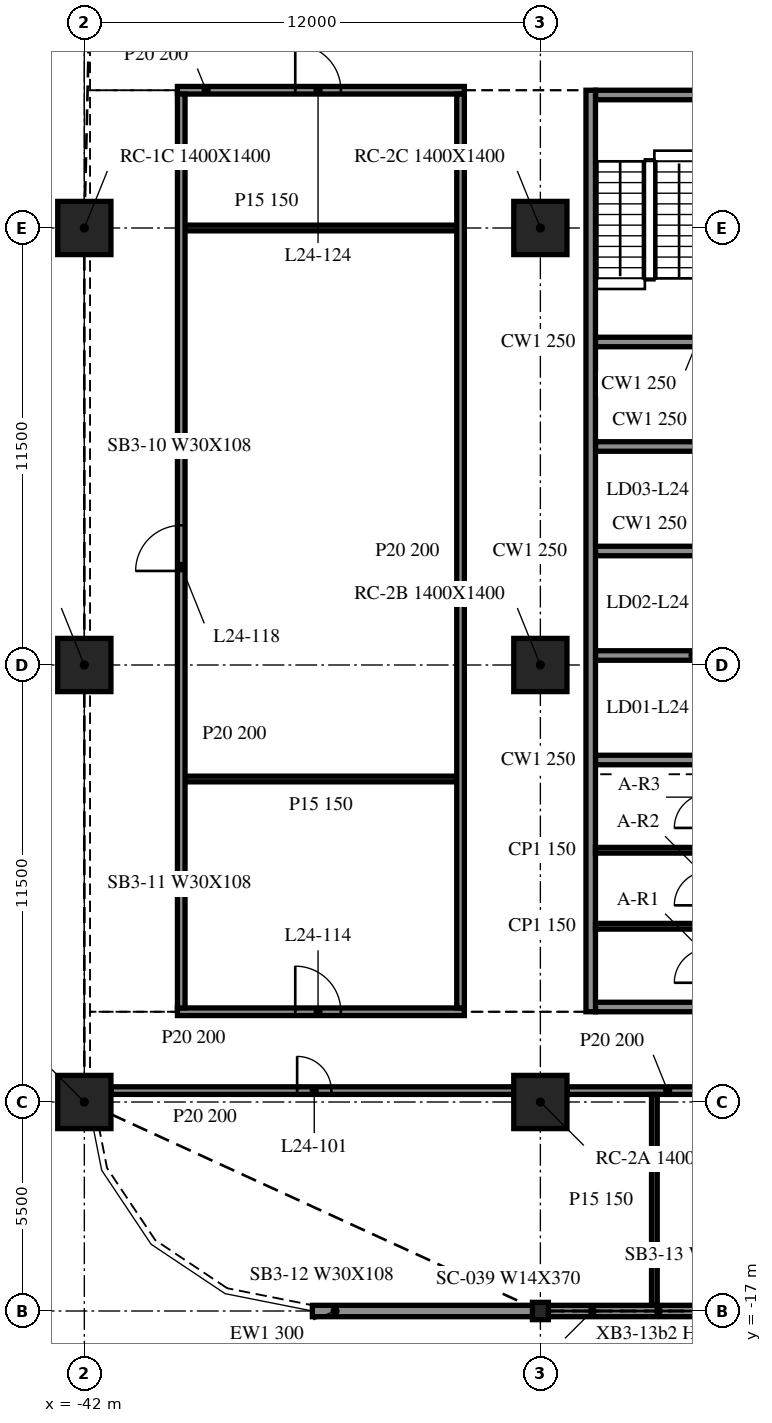
"""IFC4 building model, lengths in metres.
Left out: names, types, materials, properties, quantities, classifications, styles, units other than length and angle.
Written with IfcOpenShell. Run it as: python <this file> out.ifc"""

import sys

from ifc_helpers import new_model, si_unit, direction, frame, frame_2d, origin, origin_2d, place, context, subcontext, project, spatial, rectangle, i_section, extrude, element, fill, save


model = new_model("IFC4")
c1 = context("Model", 3, precision=1e-05, world=origin(), true_north=direction((0.0, 1.0)))
c2 = subcontext(c1, "Body", "Model", "MODEL_VIEW")
j1 = project(units=[si_unit("LENGTHUNIT", "METRE"), si_unit("PLANEANGLEUNIT", "RADIAN")], contexts=[c1])
p1 = place(None, origin())
s1 = spatial("IfcSite", under=j1, at=p1, CompositionType="ELEMENT")
p2 = place(p1, origin())
s2 = spatial("IfcBuilding", under=s1, at=p2, CompositionType="ELEMENT")
p3 = place(p2, frame((0.0, 0.0, 105.3)))
s3 = spatial("IfcBuildingStorey", under=s2, at=p3, CompositionType="ELEMENT", Elevation=105.3)
for number, where, z_axis, x_axis in (
    (1, (-42.0, -11.5, -0.34), (0.0, 0.0, 1.0), (1.0, 0.0, 0.0)),
    (2, (-42.0, 0.0, -0.34), (0.0, 0.0, 1.0), (1.0, 0.0, 0.0)),
    (3, (-42.0, 11.5, -0.34), (0.0, 0.0, 1.0), (1.0, 0.0, 0.0)),
    (4, (-30.0, -11.5, -0.34), (0.0, 0.0, 1.0), (1.0, 0.0, 0.0)),
    (5, (-30.0, 0.0, -0.34), (0.0, 0.0, 1.0), (1.0, 0.0, 0.0)),
    (6, (-30.0, 11.5, -0.34), (0.0, 0.0, 1.0), (1.0, 0.0, 0.0)),
):
    element("IfcColumn", number, at=place(p3, frame(where, z_axis=z_axis, x_axis=x_axis)), inside=s3, PredefinedType="COLUMN", context=c2, shape_type="SweptSolid", body=[
        extrude(rectangle(XDim=1.4, YDim=1.4, at=origin_2d()), origin(), (0.0, 0.0, 1.0), 4.1),
    ])
p4 = place(p3, frame((-30.0, -17.0, -0.34), z_axis=(0.0, 0.0, 1.0), x_axis=(1.0, 0.0, 0.0)))
e7 = element("IfcColumn", 7, at=p4, inside=s3, PredefinedType="COLUMN", context=c2, shape_type="SweptSolid", body=[
    extrude(i_section(OverallWidth=0.419, OverallDepth=0.455, WebThickness=0.042, FlangeThickness=0.068, at=origin_2d()), origin(), (0.0, 0.0, 1.0), 4.1),
])
p5 = place(p3, frame((-36.0, -17.0, 0.0), z_axis=(0.0, 0.0, 1.0), x_axis=(1.0, 0.0, 0.0)))
e8 = element("IfcWall", 8, at=p5, inside=s3, PredefinedType="NOTDEFINED", context=c2, shape_type="SweptSolid", body=[
    extrude(rectangle(XDim=5.979, YDim=0.3, at=frame_2d((2.99, 0.0))), origin(), (0.0, 0.0, 1.0), 3.003),
])
p6 = place(p3, frame((-29.979, -17.0, 0.0), z_axis=(0.0, 0.0, 1.0), x_axis=(1.0, 0.0, 0.0)))
e9 = element("IfcWall", 9, at=p6, inside=s3, PredefinedType="NOTDEFINED", context=c2, shape_type="SweptSolid", body=[
    extrude(rectangle(XDim=11.958, YDim=0.3, at=frame_2d((5.979, 0.0))), origin(), (0.0, 0.0, 1.0), 3.003),
])
p7 = place(p3, frame((-28.675, 15.125, 0.0), z_axis=(0.0, 0.0, 1.0), x_axis=(0.0, -1.0, 0.0)))
e10 = element("IfcWall", 10, at=p7, inside=s3, PredefinedType="SOLIDWALL", context=c2, shape_type="SweptSolid", body=[
    extrude(rectangle(XDim=24.25, YDim=0.25, at=frame_2d((12.125, 0.0))), origin(), (0.0, 0.0, 1.0), 3.76),
])
p8 = place(p3, frame((-19.45, -9.0, 0.0), z_axis=(0.0, 0.0, 1.0), x_axis=(-1.0, 0.0, 0.0)))
e11 = element("IfcWall", 11, at=p8, inside=s3, PredefinedType="SOLIDWALL", context=c2, shape_type="SweptSolid", body=[
    extrude(rectangle(XDim=9.1, YDim=0.25, at=frame_2d((4.55, 0.0))), origin(), (0.0, 0.0, 1.0), 3.76),
])
p9 = place(p8, frame((3.65, 0.0, 0.0)))
e12 = element("IfcOpeningElement", 12, at=p9, cuts=e11, PredefinedType="OPENING", context=c2, shape_type="SweptSolid", body=[
    extrude(rectangle(XDim=1.8, YDim=2.1, at=frame_2d((0.9, 1.05))), frame((0.0, 0.135, 0.0), z_axis=(0.0, -1.0, 0.0), x_axis=(1.0, 0.0, 0.0)), (0.0, 0.0, 1.0), 0.27),
])
p10 = place(p3, frame((-28.55, 15.0, 0.0), z_axis=(0.0, 0.0, 1.0), x_axis=(1.0, 0.0, 0.0)))
e13 = element("IfcWall", 13, at=p10, inside=s3, PredefinedType="SOLIDWALL", context=c2, shape_type="SweptSolid", body=[
    extrude(rectangle(XDim=9.1, YDim=0.25, at=frame_2d((4.55, 0.0))), origin(), (0.0, 0.0, 1.0), 3.76),
])
p11 = place(p10, frame((3.65, 0.0, 0.0)))
e14 = element("IfcOpeningElement", 14, at=p11, cuts=e13, PredefinedType="OPENING", context=c2, shape_type="SweptSolid", body=[
    extrude(rectangle(XDim=1.8, YDim=2.1, at=frame_2d((0.9, 1.05))), frame((0.0, 0.135, 0.0), z_axis=(0.0, -1.0, 0.0), x_axis=(1.0, 0.0, 0.0)), (0.0, 0.0, 1.0), 0.27),
])
for number, where, z_axis, x_axis in (
    (15, (-28.55, -2.5, 0.0), (0.0, 0.0, 1.0), (1.0, 0.0, 0.0)),
    (16, (-28.55, 0.25, 0.0), (0.0, 0.0, 1.0), (1.0, 0.0, 0.0)),
    (17, (-28.55, 3.0, 0.0), (0.0, 0.0, 1.0), (1.0, 0.0, 0.0)),
    (18, (-28.55, 5.75, 0.0), (0.0, 0.0, 1.0), (1.0, 0.0, 0.0)),
    (19, (-28.55, 8.5, 0.0), (0.0, 0.0, 1.0), (1.0, 0.0, 0.0)),
):
    element("IfcWall", number, at=place(p3, frame(where, z_axis=z_axis, x_axis=x_axis)), inside=s3, PredefinedType="SOLIDWALL", context=c2, shape_type="SweptSolid", body=[
        extrude(rectangle(XDim=2.85, YDim=0.25, at=frame_2d((1.425, 0.0))), origin(), (0.0, 0.0, 1.0), 3.76),
    ])
for number, where, z_axis, x_axis in (
    (20, (-28.55, -6.875, 0.0), (0.0, 0.0, 1.0), (1.0, 0.0, 0.0)),
    (21, (-28.55, -4.875, 0.0), (0.0, 0.0, 1.0), (1.0, 0.0, 0.0)),
):
    element("IfcWall", number, at=place(p3, frame(where, z_axis=z_axis, x_axis=x_axis)), inside=s3, PredefinedType="PARTITIONING", context=c2, shape_type="SweptSolid", body=[
        extrude(rectangle(XDim=2.85, YDim=0.15, at=frame_2d((1.425, 0.0))), origin(), (0.0, 0.0, 1.0), 3.76),
    ])
p12 = place(p3, frame((-41.3, -11.2, 0.0), z_axis=(0.0, 0.0, 1.0), x_axis=(1.0, 0.0, 0.0)))
e22 = element("IfcWall", 22, at=p12, inside=s3, PredefinedType="PARTITIONING", context=c2, shape_type="SweptSolid", body=[
    extrude(rectangle(XDim=10.6, YDim=0.2, at=frame_2d((5.3, 0.0))), origin(), (0.0, 0.0, 1.0), 3.76),
])
p13 = place(p12, frame((4.9, 0.0, 0.0)))
e23 = element("IfcOpeningElement", 23, at=p13, cuts=e22, PredefinedType="OPENING", context=c2, shape_type="SweptSolid", body=[
    extrude(rectangle(XDim=0.9, YDim=2.1, at=frame_2d((0.45, 1.05))), frame((0.0, 0.11, 0.0), z_axis=(0.0, -1.0, 0.0), x_axis=(1.0, 0.0, 0.0)), (0.0, 0.0, 1.0), 0.22),
])
p14 = place(p3, frame((-29.3, -11.2, 0.0), z_axis=(0.0, 0.0, 1.0), x_axis=(1.0, 0.0, 0.0)))
e24 = element("IfcWall", 24, at=p14, inside=s3, PredefinedType="PARTITIONING", context=c2, shape_type="SweptSolid", body=[
    extrude(rectangle(XDim=10.6, YDim=0.2, at=frame_2d((5.3, 0.0))), origin(), (0.0, 0.0, 1.0), 3.76),
])
p15 = place(p14, frame((4.9, 0.0, 0.0)))
e25 = element("IfcOpeningElement", 25, at=p15, cuts=e24, PredefinedType="OPENING", context=c2, shape_type="SweptSolid", body=[
    extrude(rectangle(XDim=0.9, YDim=2.1, at=frame_2d((0.45, 1.05))), frame((0.0, 0.11, 0.0), z_axis=(0.0, -1.0, 0.0), x_axis=(1.0, 0.0, 0.0)), (0.0, 0.0, 1.0), 0.22),
])
p16 = place(p14, frame((8.7, 0.0, 0.0)))
e26 = element("IfcOpeningElement", 26, at=p16, cuts=e24, PredefinedType="OPENING", context=c2, shape_type="SweptSolid", body=[
    extrude(rectangle(XDim=0.9, YDim=2.1, at=frame_2d((0.45, 1.05))), frame((0.0, 0.11, 0.0), z_axis=(0.0, -1.0, 0.0), x_axis=(1.0, 0.0, 0.0)), (0.0, 0.0, 1.0), 0.22),
])
p17 = place(p3, frame((-39.55, -9.125, 0.0), z_axis=(0.0, 0.0, 1.0), x_axis=(1.0, 0.0, 0.0)))
e27 = element("IfcWall", 27, at=p17, inside=s3, PredefinedType="PARTITIONING", context=c2, shape_type="SweptSolid", body=[
    extrude(rectangle(XDim=7.55, YDim=0.2, at=frame_2d((3.775, 0.0))), origin(), (0.0, 0.0, 1.0), 3.76),
])
p18 = place(p17, frame((3.1, 0.0, 0.0)))
e28 = element("IfcOpeningElement", 28, at=p18, cuts=e27, PredefinedType="OPENING", context=c2, shape_type="SweptSolid", body=[
    extrude(rectangle(XDim=1.2, YDim=2.1, at=frame_2d((0.6, 1.05))), frame((0.0, 0.11, 0.0), z_axis=(0.0, -1.0, 0.0), x_axis=(1.0, 0.0, 0.0)), (0.0, 0.0, 1.0), 0.22),
])
for number, where, z_axis, x_axis in (
    (29, (-39.35, -3.0, 0.0), (0.0, 0.0, 1.0), (1.0, 0.0, 0.0)),
    (30, (-39.35, 11.5, 0.0), (0.0, 0.0, 1.0), (1.0, 0.0, 0.0)),
):
    element("IfcWall", number, at=place(p3, frame(where, z_axis=z_axis, x_axis=x_axis)), inside=s3, PredefinedType="PARTITIONING", context=c2, shape_type="SweptSolid", body=[
        extrude(rectangle(XDim=7.15, YDim=0.15, at=frame_2d((3.575, 0.0))), origin(), (0.0, 0.0, 1.0), 3.76),
    ])
p19 = place(p3, frame((-39.55, 15.125, 0.0), z_axis=(0.0, 0.0, 1.0), x_axis=(1.0, 0.0, 0.0)))
e31 = element("IfcWall", 31, at=p19, inside=s3, PredefinedType="PARTITIONING", context=c2, shape_type="SweptSolid", body=[
    extrude(rectangle(XDim=7.55, YDim=0.2, at=frame_2d((3.775, 0.0))), origin(), (0.0, 0.0, 1.0), 3.76),
])
p20 = place(p19, frame((3.1, 0.0, 0.0)))
e32 = element("IfcOpeningElement", 32, at=p20, cuts=e31, PredefinedType="OPENING", context=c2, shape_type="SweptSolid", body=[
    extrude(rectangle(XDim=1.2, YDim=2.1, at=frame_2d((0.6, 1.05))), frame((0.0, 0.11, 0.0), z_axis=(0.0, -1.0, 0.0), x_axis=(1.0, 0.0, 0.0)), (0.0, 0.0, 1.0), 0.22),
])
p21 = place(p3, frame((-39.45, -9.025, 0.0), z_axis=(0.0, 0.0, 1.0), x_axis=(0.0, 1.0, 0.0)))
e33 = element("IfcWall", 33, at=p21, inside=s3, PredefinedType="PARTITIONING", context=c2, shape_type="SweptSolid", body=[
    extrude(rectangle(XDim=24.05, YDim=0.2, at=frame_2d((12.025, 0.0))), origin(), (0.0, 0.0, 1.0), 3.76),
])
p22 = place(p21, frame((11.5, 0.0, 0.0)))
e34 = element("IfcOpeningElement", 34, at=p22, cuts=e33, PredefinedType="OPENING", context=c2, shape_type="SweptSolid", body=[
    extrude(rectangle(XDim=1.2, YDim=2.1, at=frame_2d((0.6, 1.05))), frame((0.0, 0.11, 0.0), z_axis=(0.0, -1.0, 0.0), x_axis=(1.0, 0.0, 0.0)), (0.0, 0.0, 1.0), 0.22),
])
p23 = place(p3, frame((-32.1, -9.025, 0.0), z_axis=(0.0, 0.0, 1.0), x_axis=(0.0, 1.0, 0.0)))
e35 = element("IfcWall", 35, at=p23, inside=s3, PredefinedType="PARTITIONING", context=c2, shape_type="SweptSolid", body=[
    extrude(rectangle(XDim=24.05, YDim=0.2, at=frame_2d((12.025, 0.0))), origin(), (0.0, 0.0, 1.0), 3.76),
])
p24 = place(p3, frame((-27.0, -16.85, 0.0), z_axis=(0.0, 0.0, 1.0), x_axis=(0.0, 1.0, 0.0)))
e36 = element("IfcWall", 36, at=p24, inside=s3, PredefinedType="PARTITIONING", context=c2, shape_type="SweptSolid", body=[
    extrude(rectangle(XDim=5.55, YDim=0.15, at=frame_2d((2.775, 0.0))), origin(), (0.0, 0.0, 1.0), 3.76),
])
p25 = place(p13, origin())
e37 = element("IfcDoor", 37, at=p25, inside=s3, OperationType="SINGLE_SWING_LEFT", PredefinedType="DOOR", context=c2, shape_type="SweptSolid", body=[
    extrude(rectangle(XDim=0.9, YDim=2.1, at=frame_2d((0.45, 1.05))), frame((0.0, 0.025, 0.0), z_axis=(0.0, -1.0, 0.0), x_axis=(1.0, 0.0, 0.0)), (0.0, 0.0, 1.0), 0.05),
])
fill(e23, e37)
p26 = place(p18, origin())
e38 = element("IfcDoor", 38, at=p26, inside=s3, OperationType="SINGLE_SWING_LEFT", PredefinedType="DOOR", context=c2, shape_type="SweptSolid", body=[
    extrude(rectangle(XDim=1.2, YDim=2.1, at=frame_2d((0.6, 1.05))), frame((0.0, 0.025, 0.0), z_axis=(0.0, -1.0, 0.0), x_axis=(1.0, 0.0, 0.0)), (0.0, 0.0, 1.0), 0.05),
])
fill(e28, e38)
p27 = place(p22, origin())
e39 = element("IfcDoor", 39, at=p27, inside=s3, OperationType="SINGLE_SWING_LEFT", PredefinedType="DOOR", context=c2, shape_type="SweptSolid", body=[
    extrude(rectangle(XDim=1.2, YDim=2.1, at=frame_2d((0.6, 1.05))), frame((0.0, 0.025, 0.0), z_axis=(0.0, -1.0, 0.0), x_axis=(1.0, 0.0, 0.0)), (0.0, 0.0, 1.0), 0.05),
])
fill(e34, e39)
p28 = place(p20, origin())
e40 = element("IfcDoor", 40, at=p28, inside=s3, OperationType="SINGLE_SWING_RIGHT", PredefinedType="DOOR", context=c2, shape_type="SweptSolid", body=[
    extrude(rectangle(XDim=1.2, YDim=2.1, at=frame_2d((0.6, 1.05))), frame((0.0, 0.025, 0.0), z_axis=(0.0, -1.0, 0.0), x_axis=(1.0, 0.0, 0.0)), (0.0, 0.0, 1.0), 0.05),
])
fill(e32, e40)
save(model, sys.argv[1])
